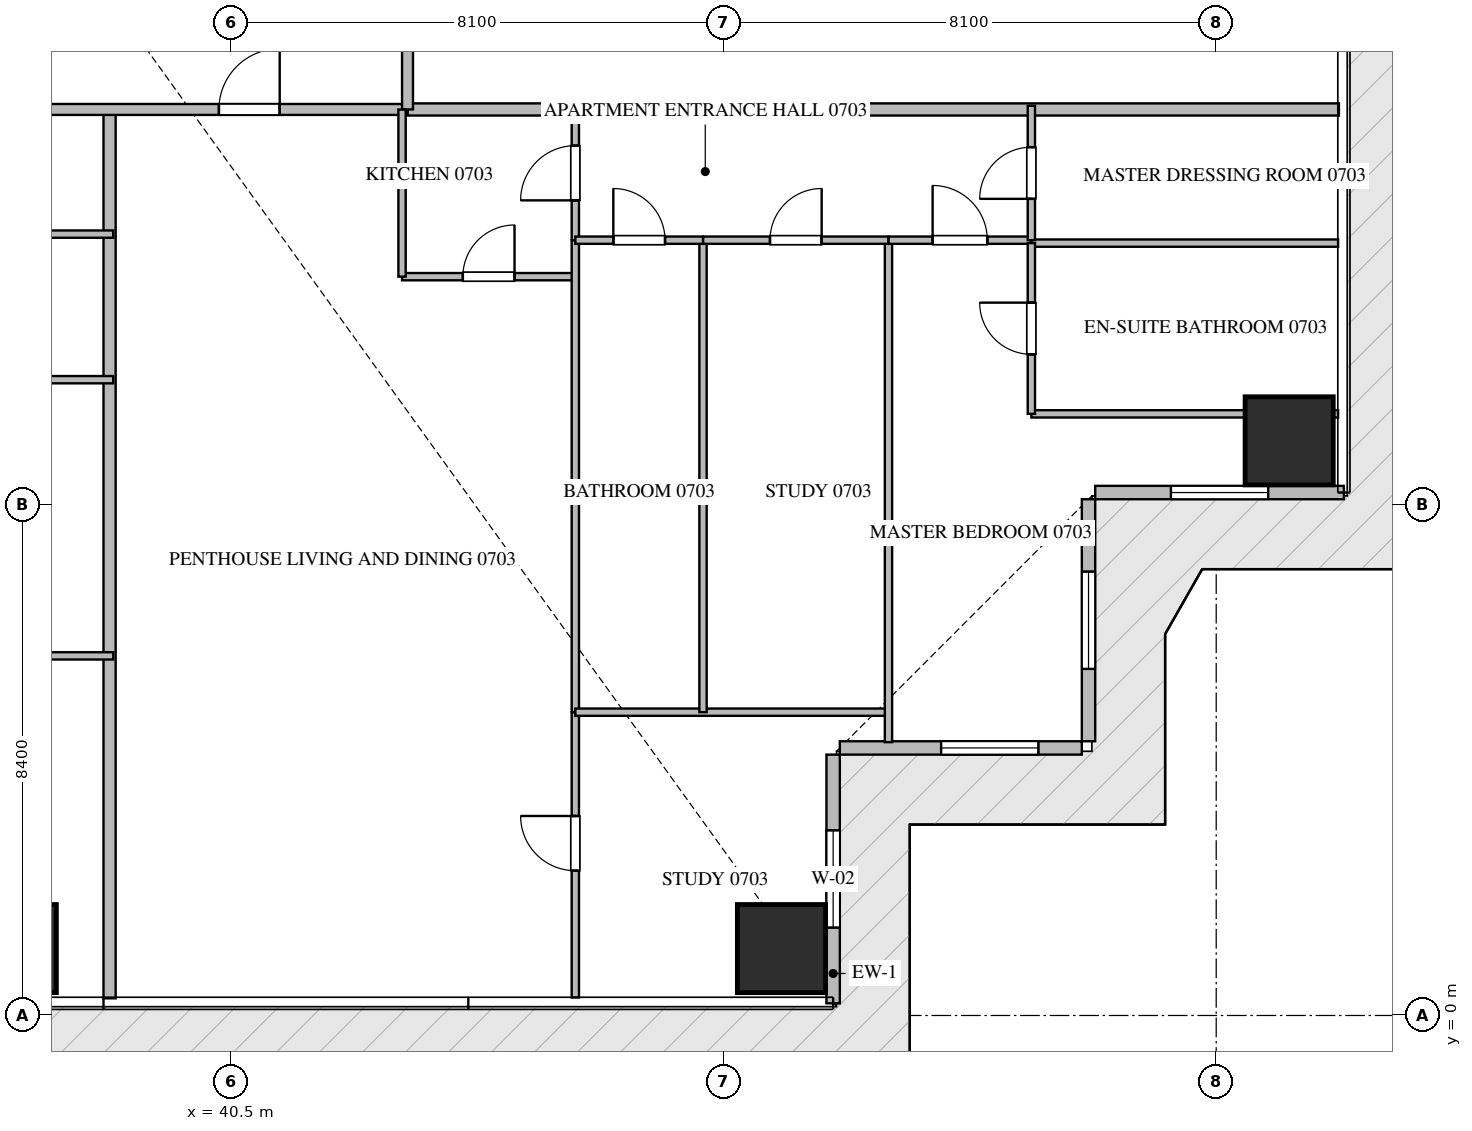
"""IFC4 building model, lengths in metres.
Left out: names, types, materials, properties, quantities, classifications, styles, units other than length and angle.
Written with IfcOpenShell. Run it as: python <this file> out.ifc"""

import sys

from ifc_helpers import new_model, si_unit, direction, frame, frame_2d, origin, origin_2d, place, context, subcontext, project, spatial, rectangle, extrude, source, transform, mapped, element, fill, save


model = new_model("IFC4")
c1 = context("Model", 3, precision=1e-05, world=origin(), true_north=direction((0.0, 1.0)))
c2 = subcontext(c1, "Body", "Model", "MODEL_VIEW")
j1 = project(units=[si_unit("LENGTHUNIT", "METRE"), si_unit("PLANEANGLEUNIT", "RADIAN")], contexts=[c1])
p1 = place(None, origin())
s1 = spatial("IfcSite", under=j1, at=p1, CompositionType="ELEMENT")
p2 = place(p1, origin())
s2 = spatial("IfcBuilding", under=s1, at=p2, CompositionType="ELEMENT")
p3 = place(p2, frame((0.0, 0.0, 34.2)))
s3 = spatial("IfcBuildingStorey", under=s2, at=p3, CompositionType="ELEMENT", Elevation=34.2)
m1 = source(origin(), c2, "Body", "SweptSolid", [
    extrude(rectangle(XDim=1.45, YDim=1.45, at=origin_2d()), origin(), (0.0, 0.0, 1.0), 3.75),
])
for number, where, z_axis, x_axis in (
    (1, (36.9, 1.1, -0.26), (0.0, 0.0, 1.0), (1.0, 0.0, 0.0)),
    (2, (49.55, 1.1, -0.26), (0.0, 0.0, 1.0), (1.0, 0.0, 0.0)),
    (3, (57.9, 9.45, -0.26), (0.0, 0.0, 1.0), (1.0, 0.0, 0.0)),
):
    element("IfcColumn", number, at=place(p3, frame(where, z_axis=z_axis, x_axis=x_axis)), inside=s3, PredefinedType="COLUMN", context=c2, shape_type="MappedRepresentation", body=[
        mapped(m1, transform((0.0, 0.0, 0.0), scale=1.0)),
    ])
p4 = place(p3, frame((50.4, 0.2, 0.0), z_axis=(0.0, 0.0, 1.0), x_axis=(0.0, 1.0, 0.0)))
e4 = element("IfcWall", 4, at=p4, inside=s3, PredefinedType="ELEMENTEDWALL", context=c2, shape_type="SweptSolid", body=[
    extrude(rectangle(XDim=4.09, YDim=0.22, at=frame_2d((2.045, 0.0))), origin(), (0.0, 0.0, 1.0), 3.475),
])
p5 = place(p4, frame((1.245, 0.0, 0.65)))
e5 = element("IfcOpeningElement", 5, at=p5, cuts=e4, PredefinedType="OPENING", context=c2, shape_type="SweptSolid", body=[
    extrude(rectangle(XDim=1.6, YDim=2.1, at=frame_2d((0.8, 1.05))), frame((0.0, 0.12, 0.0), z_axis=(0.0, -1.0, 0.0), x_axis=(1.0, 0.0, 0.0)), (0.0, 0.0, 1.0), 0.24),
])
p6 = place(p3, frame((50.51, 4.4, 0.0), z_axis=(0.0, 0.0, 1.0), x_axis=(1.0, 0.0, 0.0)))
e6 = element("IfcWall", 6, at=p6, inside=s3, PredefinedType="ELEMENTEDWALL", context=c2, shape_type="SweptSolid", body=[
    extrude(rectangle(XDim=3.98, YDim=0.22, at=frame_2d((1.99, 0.0))), origin(), (0.0, 0.0, 1.0), 3.475),
])
p7 = place(p6, frame((1.666, 0.0, 0.65)))
e7 = element("IfcOpeningElement", 7, at=p7, cuts=e6, PredefinedType="OPENING", context=c2, shape_type="SweptSolid", body=[
    extrude(rectangle(XDim=1.6, YDim=2.1, at=frame_2d((0.8, 1.05))), frame((0.0, 0.12, 0.0), z_axis=(0.0, -1.0, 0.0), x_axis=(1.0, 0.0, 0.0)), (0.0, 0.0, 1.0), 0.24),
])
p8 = place(p3, frame((54.6, 4.51, 0.0), z_axis=(0.0, 0.0, 1.0), x_axis=(0.0, 1.0, 0.0)))
e8 = element("IfcWall", 8, at=p8, inside=s3, PredefinedType="ELEMENTEDWALL", context=c2, shape_type="SweptSolid", body=[
    extrude(rectangle(XDim=3.98, YDim=0.22, at=frame_2d((1.99, 0.0))), origin(), (0.0, 0.0, 1.0), 3.475),
])
p9 = place(p8, frame((1.19, 0.0, 0.65)))
e9 = element("IfcOpeningElement", 9, at=p9, cuts=e8, PredefinedType="OPENING", context=c2, shape_type="SweptSolid", body=[
    extrude(rectangle(XDim=1.6, YDim=2.1, at=frame_2d((0.8, 1.05))), frame((0.0, 0.12, 0.0), z_axis=(0.0, -1.0, 0.0), x_axis=(1.0, 0.0, 0.0)), (0.0, 0.0, 1.0), 0.24),
])
p10 = place(p3, frame((54.71, 8.6, 0.0), z_axis=(0.0, 0.0, 1.0), x_axis=(1.0, 0.0, 0.0)))
e10 = element("IfcWall", 10, at=p10, inside=s3, PredefinedType="ELEMENTEDWALL", context=c2, shape_type="SweptSolid", body=[
    extrude(rectangle(XDim=4.09, YDim=0.22, at=frame_2d((2.045, 0.0))), origin(), (0.0, 0.0, 1.0), 3.475),
])
p11 = place(p10, frame((1.245, 0.0, 0.65)))
e11 = element("IfcOpeningElement", 11, at=p11, cuts=e10, PredefinedType="OPENING", context=c2, shape_type="SweptSolid", body=[
    extrude(rectangle(XDim=1.6, YDim=2.1, at=frame_2d((0.8, 1.05))), frame((0.0, 0.12, 0.0), z_axis=(0.0, -1.0, 0.0), x_axis=(1.0, 0.0, 0.0)), (0.0, 0.0, 1.0), 0.24),
])
p12 = place(p3, frame((38.5, 0.282, 0.0), z_axis=(0.0, 0.0, 1.0), x_axis=(0.0, 1.0, 0.0)))
e12 = element("IfcWall", 12, at=p12, inside=s3, PredefinedType="PARTITIONING", context=c2, shape_type="SweptSolid", body=[
    extrude(rectangle(XDim=14.618, YDim=0.2, at=frame_2d((7.309, 0.0))), origin(), (0.0, 0.0, 1.0), 3.49),
])
p13 = place(p3, frame((43.4, 14.9, 0.0), z_axis=(0.0, 0.0, 1.0), x_axis=(1.0, 0.0, 0.0)))
e13 = element("IfcWall", 13, at=p13, inside=s3, PredefinedType="PARTITIONING", context=c2, shape_type="SweptSolid", body=[
    extrude(rectangle(XDim=15.318, YDim=0.2, at=frame_2d((7.659, 0.0))), origin(), (0.0, 0.0, 1.0), 3.49),
])
p14 = place(p3, frame((21.402, 14.9, 0.0), z_axis=(0.0, 0.0, 1.0), x_axis=(1.0, 0.0, 0.0)))
e14 = element("IfcWall", 14, at=p14, inside=s3, PredefinedType="PARTITIONING", context=c2, shape_type="SweptSolid", body=[
    extrude(rectangle(XDim=21.996, YDim=0.18, at=frame_2d((10.998, 0.0))), origin(), (0.0, 0.0, 1.0), 3.49),
])
p15 = place(p14, frame((2.1, 0.0, 0.0)))
e15 = element("IfcOpeningElement", 15, at=p15, cuts=e14, PredefinedType="OPENING", context=c2, shape_type="SweptSolid", body=[
    extrude(rectangle(XDim=1.0, YDim=2.15, at=frame_2d((0.5, 1.075))), frame((0.0, 0.1, 0.0), z_axis=(0.0, -1.0, 0.0), x_axis=(1.0, 0.0, 0.0)), (0.0, 0.0, 1.0), 0.2),
])
p16 = place(p14, frame((6.719, 0.0, 0.0)))
e16 = element("IfcOpeningElement", 16, at=p16, cuts=e14, PredefinedType="OPENING", context=c2, shape_type="SweptSolid", body=[
    extrude(rectangle(XDim=1.0, YDim=2.15, at=frame_2d((0.5, 1.075))), frame((0.0, 0.1, 0.0), z_axis=(0.0, -1.0, 0.0), x_axis=(1.0, 0.0, 0.0)), (0.0, 0.0, 1.0), 0.2),
])
p17 = place(p14, frame((18.896, 0.0, 0.0)))
e17 = element("IfcOpeningElement", 17, at=p17, cuts=e14, PredefinedType="OPENING", context=c2, shape_type="SweptSolid", body=[
    extrude(rectangle(XDim=1.0, YDim=2.15, at=frame_2d((0.5, 1.075))), frame((0.0, 0.1, 0.0), z_axis=(0.0, -1.0, 0.0), x_axis=(1.0, 0.0, 0.0)), (0.0, 0.0, 1.0), 0.2),
])
p18 = place(p3, frame((43.4, 14.9, 0.0), z_axis=(0.0, 0.0, 1.0), x_axis=(0.0, 1.0, 0.0)))
e18 = element("IfcWall", 18, at=p18, inside=s3, PredefinedType="PARTITIONING", context=c2, shape_type="SweptSolid", body=[
    extrude(rectangle(XDim=20.6, YDim=0.18, at=frame_2d((10.3, 0.0))), origin(), (0.0, 0.0, 1.0), 3.49),
])
p19 = place(p18, frame((1.96, 0.0, 0.0)))
e19 = element("IfcOpeningElement", 19, at=p19, cuts=e18, PredefinedType="OPENING", context=c2, shape_type="SweptSolid", body=[
    extrude(rectangle(XDim=1.0, YDim=2.15, at=frame_2d((0.5, 1.075))), frame((0.0, 0.1, 0.0), z_axis=(0.0, -1.0, 0.0), x_axis=(1.0, 0.0, 0.0)), (0.0, 0.0, 1.0), 0.2),
])
for number, where, z_axis, x_axis in (
    (20, (30.94, 5.914, 0.0), (0.0, 0.0, 1.0), (1.0, 0.0, 0.0)),
    (21, (30.94, 10.456, 0.0), (0.0, 0.0, 1.0), (1.0, 0.0, 0.0)),
    (22, (30.94, 12.85, 0.0), (0.0, 0.0, 1.0), (1.0, 0.0, 0.0)),
):
    element("IfcWall", number, at=place(p3, frame(where, z_axis=z_axis, x_axis=x_axis)), inside=s3, PredefinedType="PARTITIONING", context=c2, shape_type="SweptSolid", body=[
        extrude(rectangle(XDim=7.62, YDim=0.12, at=frame_2d((3.81, 0.0))), origin(), (0.0, 0.0, 1.0), 3.49),
    ])
p20 = place(p3, frame((43.31, 12.15, 0.0), z_axis=(0.0, 0.0, 1.0), x_axis=(1.0, 0.0, 0.0)))
e23 = element("IfcWall", 23, at=p20, inside=s3, PredefinedType="PARTITIONING", context=c2, shape_type="SweptSolid", body=[
    extrude(rectangle(XDim=2.85, YDim=0.12, at=frame_2d((1.425, 0.0))), origin(), (0.0, 0.0, 1.0), 3.49),
])
p21 = place(p20, frame((1.0, 0.0, 0.0)))
e24 = element("IfcOpeningElement", 24, at=p21, cuts=e23, PredefinedType="OPENING", context=c2, shape_type="SweptSolid", body=[
    extrude(rectangle(XDim=0.85, YDim=2.1, at=frame_2d((0.425, 1.05))), frame((0.0, 0.07, 0.0), z_axis=(0.0, -1.0, 0.0), x_axis=(1.0, 0.0, 0.0)), (0.0, 0.0, 1.0), 0.14),
])
p22 = place(p3, frame((43.31, 12.15, 0.0), z_axis=(0.0, 0.0, 1.0), x_axis=(0.0, 1.0, 0.0)))
e25 = element("IfcWall", 25, at=p22, inside=s3, PredefinedType="PARTITIONING", context=c2, shape_type="SweptSolid", body=[
    extrude(rectangle(XDim=2.748, YDim=0.12, at=frame_2d((1.374, 0.0))), origin(), (0.0, 0.0, 1.0), 3.49),
])
p23 = place(p3, frame((46.16, 12.75, 0.0), z_axis=(0.0, 0.0, 1.0), x_axis=(0.0, 1.0, 0.0)))
e26 = element("IfcWall", 26, at=p23, inside=s3, PredefinedType="PARTITIONING", context=c2, shape_type="SweptSolid", body=[
    extrude(rectangle(XDim=2.21, YDim=0.12, at=frame_2d((1.105, 0.0))), origin(), (0.0, 0.0, 1.0), 3.49),
])
p24 = place(p23, frame((0.655, 0.0, 0.0)))
e27 = element("IfcOpeningElement", 27, at=p24, cuts=e26, PredefinedType="OPENING", context=c2, shape_type="SweptSolid", body=[
    extrude(rectangle(XDim=0.9, YDim=2.1, at=frame_2d((0.45, 1.05))), frame((0.0, 0.07, 0.0), z_axis=(0.0, -1.0, 0.0), x_axis=(1.0, 0.0, 0.0)), (0.0, 0.0, 1.0), 0.14),
])
p25 = place(p3, frame((46.16, 0.295, 0.0), z_axis=(0.0, 0.0, 1.0), x_axis=(0.0, 1.0, 0.0)))
e28 = element("IfcWall", 28, at=p25, inside=s3, PredefinedType="PARTITIONING", context=c2, shape_type="SweptSolid", body=[
    extrude(rectangle(XDim=4.693, YDim=0.12, at=frame_2d((2.347, 0.0))), origin(), (0.0, 0.0, 1.0), 3.49),
])
p26 = place(p25, frame((2.086, 0.0, 0.0)))
e29 = element("IfcOpeningElement", 29, at=p26, cuts=e28, PredefinedType="OPENING", context=c2, shape_type="SweptSolid", body=[
    extrude(rectangle(XDim=0.9, YDim=2.1, at=frame_2d((0.45, 1.05))), frame((0.0, 0.07, 0.0), z_axis=(0.0, -1.0, 0.0), x_axis=(1.0, 0.0, 0.0)), (0.0, 0.0, 1.0), 0.14),
])
p27 = place(p3, frame((46.16, 4.99, 0.0), z_axis=(0.0, 0.0, 1.0), x_axis=(0.0, 1.0, 0.0)))
e30 = element("IfcWall", 30, at=p27, inside=s3, PredefinedType="PARTITIONING", context=c2, shape_type="SweptSolid", body=[
    extrude(rectangle(XDim=7.758, YDim=0.12, at=frame_2d((3.879, 0.0))), origin(), (0.0, 0.0, 1.0), 3.49),
])
p28 = place(p3, frame((46.16, 4.988, 0.0), z_axis=(0.0, 0.0, 1.0), x_axis=(1.0, 0.0, 0.0)))
e31 = element("IfcWall", 31, at=p28, inside=s3, PredefinedType="PARTITIONING", context=c2, shape_type="SweptSolid", body=[
    extrude(rectangle(XDim=5.15, YDim=0.12, at=frame_2d((2.575, 0.0))), origin(), (0.0, 0.0, 1.0), 3.49),
])
p29 = place(p3, frame((51.31, 4.495, 0.0), z_axis=(0.0, 0.0, 1.0), x_axis=(0.0, 1.0, 0.0)))
e32 = element("IfcWall", 32, at=p29, inside=s3, PredefinedType="PARTITIONING", context=c2, shape_type="SweptSolid", body=[
    extrude(rectangle(XDim=8.255, YDim=0.12, at=frame_2d((4.127, 0.0))), origin(), (0.0, 0.0, 1.0), 3.49),
])
p30 = place(p3, frame((48.26, 4.988, 0.0), z_axis=(0.0, 0.0, 1.0), x_axis=(0.0, 1.0, 0.0)))
e33 = element("IfcWall", 33, at=p30, inside=s3, PredefinedType="PARTITIONING", context=c2, shape_type="SweptSolid", body=[
    extrude(rectangle(XDim=7.762, YDim=0.12, at=frame_2d((3.881, 0.0))), origin(), (0.0, 0.0, 1.0), 3.49),
])
p31 = place(p3, frame((46.16, 12.75, 0.0), z_axis=(0.0, 0.0, 1.0), x_axis=(1.0, 0.0, 0.0)))
e34 = element("IfcWall", 34, at=p31, inside=s3, PredefinedType="PARTITIONING", context=c2, shape_type="SweptSolid", body=[
    extrude(rectangle(XDim=2.1, YDim=0.12, at=frame_2d((1.05, 0.0))), origin(), (0.0, 0.0, 1.0), 3.49),
])
p32 = place(p31, frame((0.625, 0.0, 0.0)))
e35 = element("IfcOpeningElement", 35, at=p32, cuts=e34, PredefinedType="OPENING", context=c2, shape_type="SweptSolid", body=[
    extrude(rectangle(XDim=0.85, YDim=2.1, at=frame_2d((0.425, 1.05))), frame((0.0, 0.07, 0.0), z_axis=(0.0, -1.0, 0.0), x_axis=(1.0, 0.0, 0.0)), (0.0, 0.0, 1.0), 0.14),
])
p33 = place(p3, frame((48.262, 12.75, 0.0), z_axis=(0.0, 0.0, 1.0), x_axis=(1.0, 0.0, 0.0)))
e36 = element("IfcWall", 36, at=p33, inside=s3, PredefinedType="PARTITIONING", context=c2, shape_type="SweptSolid", body=[
    extrude(rectangle(XDim=3.048, YDim=0.12, at=frame_2d((1.524, 0.0))), origin(), (0.0, 0.0, 1.0), 3.49),
])
p34 = place(p33, frame((1.099, 0.0, 0.0)))
e37 = element("IfcOpeningElement", 37, at=p34, cuts=e36, PredefinedType="OPENING", context=c2, shape_type="SweptSolid", body=[
    extrude(rectangle(XDim=0.85, YDim=2.1, at=frame_2d((0.425, 1.05))), frame((0.0, 0.07, 0.0), z_axis=(0.0, -1.0, 0.0), x_axis=(1.0, 0.0, 0.0)), (0.0, 0.0, 1.0), 0.14),
])
p35 = place(p3, frame((51.312, 12.75, 0.0), z_axis=(0.0, 0.0, 1.0), x_axis=(1.0, 0.0, 0.0)))
e38 = element("IfcWall", 38, at=p35, inside=s3, PredefinedType="PARTITIONING", context=c2, shape_type="SweptSolid", body=[
    extrude(rectangle(XDim=2.348, YDim=0.12, at=frame_2d((1.174, 0.0))), origin(), (0.0, 0.0, 1.0), 3.49),
])
p36 = place(p35, frame((0.724, 0.0, 0.0)))
e39 = element("IfcOpeningElement", 39, at=p36, cuts=e38, PredefinedType="OPENING", context=c2, shape_type="SweptSolid", body=[
    extrude(rectangle(XDim=0.9, YDim=2.1, at=frame_2d((0.45, 1.05))), frame((0.0, 0.07, 0.0), z_axis=(0.0, -1.0, 0.0), x_axis=(1.0, 0.0, 0.0)), (0.0, 0.0, 1.0), 0.14),
])
p37 = place(p3, frame((53.66, 9.894, 0.0), z_axis=(0.0, 0.0, 1.0), x_axis=(1.0, 0.0, 0.0)))
e40 = element("IfcWall", 40, at=p37, inside=s3, PredefinedType="PARTITIONING", context=c2, shape_type="SweptSolid", body=[
    extrude(rectangle(XDim=5.045, YDim=0.12, at=frame_2d((2.522, 0.0))), origin(), (0.0, 0.0, 1.0), 3.49),
])
p38 = place(p3, frame((53.662, 12.702, 0.0), z_axis=(0.0, 0.0, 1.0), x_axis=(1.0, 0.0, 0.0)))
e41 = element("IfcWall", 41, at=p38, inside=s3, PredefinedType="PARTITIONING", context=c2, shape_type="SweptSolid", body=[
    extrude(rectangle(XDim=5.043, YDim=0.12, at=frame_2d((2.521, 0.0))), origin(), (0.0, 0.0, 1.0), 3.49),
])
p39 = place(p3, frame((53.66, 9.894, 0.0), z_axis=(0.0, 0.0, 1.0), x_axis=(0.0, 1.0, 0.0)))
e42 = element("IfcWall", 42, at=p39, inside=s3, PredefinedType="PARTITIONING", context=c2, shape_type="SweptSolid", body=[
    extrude(rectangle(XDim=2.808, YDim=0.12, at=frame_2d((1.404, 0.0))), origin(), (0.0, 0.0, 1.0), 3.49),
])
p40 = place(p39, frame((0.979, 0.0, 0.0)))
e43 = element("IfcOpeningElement", 43, at=p40, cuts=e42, PredefinedType="OPENING", context=c2, shape_type="SweptSolid", body=[
    extrude(rectangle(XDim=0.85, YDim=2.1, at=frame_2d((0.425, 1.05))), frame((0.0, 0.07, 0.0), z_axis=(0.0, -1.0, 0.0), x_axis=(1.0, 0.0, 0.0)), (0.0, 0.0, 1.0), 0.14),
])
p41 = place(p3, frame((53.66, 12.75, 0.0), z_axis=(0.0, 0.0, 1.0), x_axis=(0.0, 1.0, 0.0)))
e44 = element("IfcWall", 44, at=p41, inside=s3, PredefinedType="PARTITIONING", context=c2, shape_type="SweptSolid", body=[
    extrude(rectangle(XDim=2.21, YDim=0.12, at=frame_2d((1.105, 0.0))), origin(), (0.0, 0.0, 1.0), 3.49),
])
p42 = place(p41, frame((0.68, 0.0, 0.0)))
e45 = element("IfcOpeningElement", 45, at=p42, cuts=e44, PredefinedType="OPENING", context=c2, shape_type="SweptSolid", body=[
    extrude(rectangle(XDim=0.85, YDim=2.1, at=frame_2d((0.425, 1.05))), frame((0.0, 0.07, 0.0), z_axis=(0.0, -1.0, 0.0), x_axis=(1.0, 0.0, 0.0)), (0.0, 0.0, 1.0), 0.14),
])
m2 = source(origin(), c2, "Body", "SweptSolid", [
    extrude(rectangle(XDim=1.6, YDim=2.1, at=frame_2d((0.8, 1.05))), frame((0.0, 0.03, 0.0), z_axis=(0.0, -1.0, 0.0), x_axis=(1.0, 0.0, 0.0)), (0.0, 0.0, 1.0), 0.06),
])
p43 = place(p5, origin())
e46 = element("IfcWindow", 46, at=p43, inside=s3, PartitioningType="SINGLE_PANEL", PredefinedType="WINDOW", context=c2, shape_type="MappedRepresentation", body=[
    mapped(m2, transform((0.0, 0.0, 0.0), scale=1.0)),
])
fill(e5, e46)
p44 = place(p7, origin())
e47 = element("IfcWindow", 47, at=p44, inside=s3, PartitioningType="SINGLE_PANEL", PredefinedType="WINDOW", context=c2, shape_type="MappedRepresentation", body=[
    mapped(m2, transform((0.0, 0.0, 0.0), scale=1.0)),
])
fill(e7, e47)
p45 = place(p9, origin())
e48 = element("IfcWindow", 48, at=p45, inside=s3, PartitioningType="SINGLE_PANEL", PredefinedType="WINDOW", context=c2, shape_type="MappedRepresentation", body=[
    mapped(m2, transform((0.0, 0.0, 0.0), scale=1.0)),
])
fill(e9, e48)
p46 = place(p11, origin())
e49 = element("IfcWindow", 49, at=p46, inside=s3, PartitioningType="SINGLE_PANEL", PredefinedType="WINDOW", context=c2, shape_type="MappedRepresentation", body=[
    mapped(m2, transform((0.0, 0.0, 0.0), scale=1.0)),
])
fill(e11, e49)
m3 = source(origin(), c2, "Body", "SweptSolid", [
    extrude(rectangle(XDim=1.0, YDim=2.15, at=frame_2d((0.5, 1.075))), frame((0.0, 0.025, 0.0), z_axis=(0.0, -1.0, 0.0), x_axis=(1.0, 0.0, 0.0)), (0.0, 0.0, 1.0), 0.05),
])
p47 = place(p17, origin())
e50 = element("IfcDoor", 50, at=p47, inside=s3, OperationType="SINGLE_SWING_RIGHT", PredefinedType="DOOR", context=c2, shape_type="MappedRepresentation", body=[
    mapped(m3, transform((0.0, 0.0, 0.0), scale=1.0)),
])
fill(e17, e50)
m4 = source(origin(), c2, "Body", "SweptSolid", [
    extrude(rectangle(XDim=0.85, YDim=2.1, at=frame_2d((0.425, 1.05))), frame((0.0, 0.025, 0.0), z_axis=(0.0, -1.0, 0.0), x_axis=(1.0, 0.0, 0.0)), (0.0, 0.0, 1.0), 0.05),
])
p48 = place(p21, origin())
e51 = element("IfcDoor", 51, at=p48, inside=s3, OperationType="SINGLE_SWING_RIGHT", PredefinedType="DOOR", context=c2, shape_type="MappedRepresentation", body=[
    mapped(m4, transform((0.0, 0.0, 0.0), scale=1.0)),
])
fill(e24, e51)
m5 = source(origin(), c2, "Body", "SweptSolid", [
    extrude(rectangle(XDim=0.9, YDim=2.1, at=frame_2d((0.45, 1.05))), frame((0.0, 0.025, 0.0), z_axis=(0.0, -1.0, 0.0), x_axis=(1.0, 0.0, 0.0)), (0.0, 0.0, 1.0), 0.05),
])
p49 = place(p24, origin())
e52 = element("IfcDoor", 52, at=p49, inside=s3, OperationType="SINGLE_SWING_LEFT", PredefinedType="DOOR", context=c2, shape_type="MappedRepresentation", body=[
    mapped(m5, transform((0.0, 0.0, 0.0), scale=1.0)),
])
fill(e27, e52)
p50 = place(p26, origin())
e53 = element("IfcDoor", 53, at=p50, inside=s3, OperationType="SINGLE_SWING_RIGHT", PredefinedType="DOOR", context=c2, shape_type="MappedRepresentation", body=[
    mapped(m5, transform((0.0, 0.0, 0.0), scale=1.0)),
])
fill(e29, e53)
p51 = place(p32, origin())
e54 = element("IfcDoor", 54, at=p51, inside=s3, OperationType="SINGLE_SWING_LEFT", PredefinedType="DOOR", context=c2, shape_type="MappedRepresentation", body=[
    mapped(m4, transform((0.0, 0.0, 0.0), scale=1.0)),
])
fill(e35, e54)
p52 = place(p34, origin())
e55 = element("IfcDoor", 55, at=p52, inside=s3, OperationType="SINGLE_SWING_RIGHT", PredefinedType="DOOR", context=c2, shape_type="MappedRepresentation", body=[
    mapped(m4, transform((0.0, 0.0, 0.0), scale=1.0)),
])
fill(e37, e55)
p53 = place(p36, origin())
e56 = element("IfcDoor", 56, at=p53, inside=s3, OperationType="SINGLE_SWING_LEFT", PredefinedType="DOOR", context=c2, shape_type="MappedRepresentation", body=[
    mapped(m5, transform((0.0, 0.0, 0.0), scale=1.0)),
])
fill(e39, e56)
p54 = place(p40, origin())
e57 = element("IfcDoor", 57, at=p54, inside=s3, OperationType="SINGLE_SWING_RIGHT", PredefinedType="DOOR", context=c2, shape_type="MappedRepresentation", body=[
    mapped(m4, transform((0.0, 0.0, 0.0), scale=1.0)),
])
fill(e43, e57)
p55 = place(p42, origin())
e58 = element("IfcDoor", 58, at=p55, inside=s3, OperationType="SINGLE_SWING_LEFT", PredefinedType="DOOR", context=c2, shape_type="MappedRepresentation", body=[
    mapped(m4, transform((0.0, 0.0, 0.0), scale=1.0)),
])
fill(e45, e58)
save(model, sys.argv[1])
